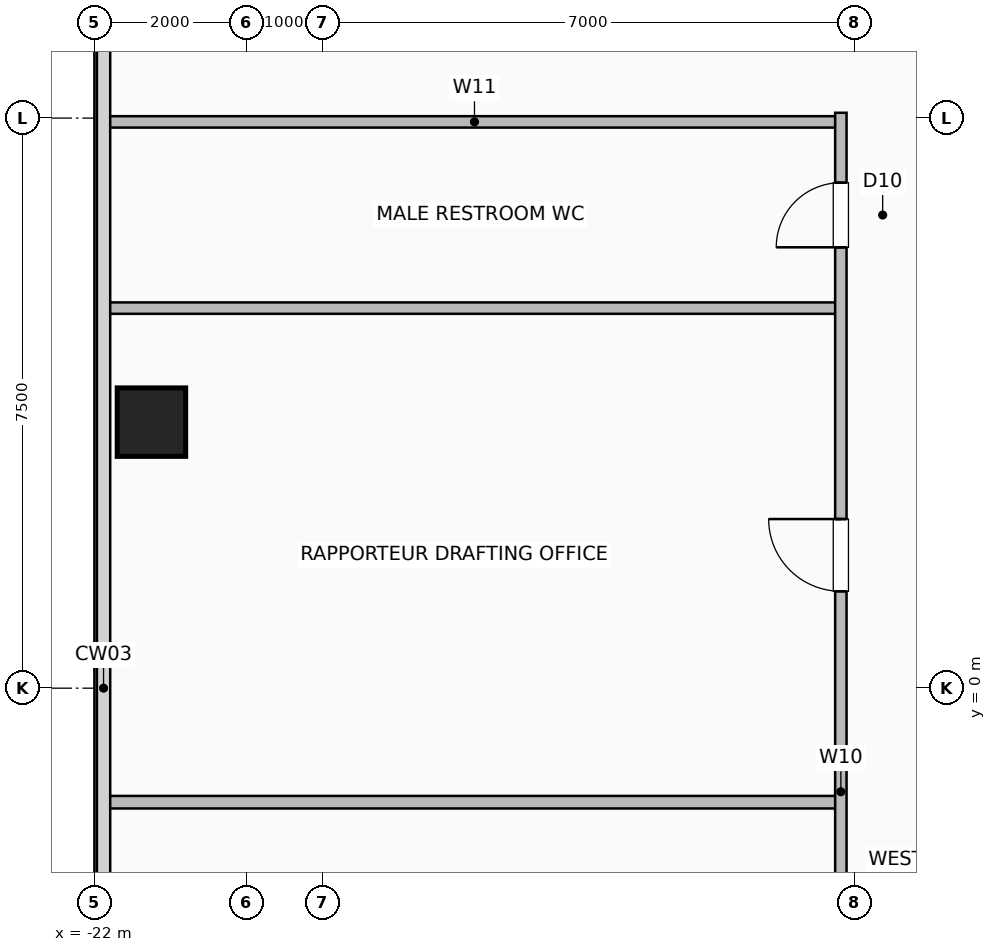
"""IFC4 building model, lengths in metres.
Left out: names, types, materials, properties, quantities, classifications, styles, units other than length and angle.
Written with IfcOpenShell. Run it as: python <this file> out.ifc"""

import sys

from ifc_helpers import new_model, si_unit, direction, frame, frame_2d, origin, origin_2d, place, context, subcontext, project, spatial, rectangle, hollow_rectangle, extrude, element, fill, save


model = new_model("IFC4")
c1 = context("Model", 3, precision=1e-05, world=origin(), true_north=direction((0.0, 1.0)))
c2 = subcontext(c1, "Body", "Model", "MODEL_VIEW")
j1 = project(units=[si_unit("LENGTHUNIT", "METRE"), si_unit("PLANEANGLEUNIT", "RADIAN")], contexts=[c1])
p1 = place(None, origin())
s1 = spatial("IfcSite", under=j1, at=p1, CompositionType="ELEMENT")
p2 = place(p1, origin())
s2 = spatial("IfcBuilding", under=s1, at=p2, CompositionType="ELEMENT")
p3 = place(p2, frame((0.0, 0.0, 97.6)))
s3 = spatial("IfcBuildingStorey", under=s2, at=p3, CompositionType="ELEMENT", Elevation=97.6)
p4 = place(p3, frame((-21.25, 3.5, 0.0), z_axis=(0.0, 0.0, 1.0), x_axis=(1.0, 0.0, 0.0)))
e1 = element("IfcColumn", 1, at=p4, inside=s3, PredefinedType="COLUMN", context=c2, shape_type="SweptSolid", body=[
    extrude(hollow_rectangle(XDim=0.9, YDim=0.9, WallThickness=0.045, at=origin_2d()), origin(), (0.0, 0.0, 1.0), 3.6),
])
p5 = place(p3, frame((-21.82, -1.5, 0.0), z_axis=(0.0, 0.0, 1.0), x_axis=(1.0, 0.0, 0.0)))
e2 = element("IfcWall", 2, at=p5, inside=s3, PredefinedType="PLUMBINGWALL", context=c2, shape_type="SweptSolid", body=[
    extrude(rectangle(XDim=9.64, YDim=0.165, at=frame_2d((4.82, 0.0))), origin(), (0.0, 0.0, 1.0), 3.36),
])
for number, where, z_axis, x_axis in (
    (3, (-21.82, 5.0, 0.0), (0.0, 0.0, 1.0), (1.0, 0.0, 0.0)),
    (4, (-21.82, 7.45, 0.0), (0.0, 0.0, 1.0), (1.0, 0.0, 0.0)),
):
    element("IfcWall", number, at=place(p3, frame(where, z_axis=z_axis, x_axis=x_axis)), inside=s3, PredefinedType="PARTITIONING", context=c2, shape_type="SweptSolid", body=[
        extrude(rectangle(XDim=9.64, YDim=0.15, at=frame_2d((4.82, 0.0))), origin(), (0.0, 0.0, 1.0), 3.36),
    ])
p6 = place(p3, frame((-12.18, -7.57, 0.0), z_axis=(0.0, 0.0, 1.0), x_axis=(0.0, 1.0, 0.0)))
e5 = element("IfcWall", 5, at=p6, inside=s3, PredefinedType="PARTITIONING", context=c2, shape_type="SweptSolid", body=[
    extrude(rectangle(XDim=15.14, YDim=0.15, at=frame_2d((7.57, 0.0))), origin(), (0.0, 0.0, 1.0), 3.36),
])
p7 = place(p6, frame((2.62, 0.0, 0.0)))
e6 = element("IfcOpeningElement", 6, at=p7, cuts=e5, PredefinedType="OPENING", context=c2, shape_type="SweptSolid", body=[
    extrude(rectangle(XDim=0.95, YDim=2.06, at=frame_2d((0.475, 1.03))), frame((0.0, 0.085, 0.0), z_axis=(0.0, -1.0, 0.0), x_axis=(1.0, 0.0, 0.0)), (0.0, 0.0, 1.0), 0.17),
])
p8 = place(p6, frame((8.845, 0.0, 0.0)))
e7 = element("IfcOpeningElement", 7, at=p8, cuts=e5, PredefinedType="OPENING", context=c2, shape_type="SweptSolid", body=[
    extrude(rectangle(XDim=0.95, YDim=2.06, at=frame_2d((0.475, 1.03))), frame((0.0, 0.085, 0.0), z_axis=(0.0, -1.0, 0.0), x_axis=(1.0, 0.0, 0.0)), (0.0, 0.0, 1.0), 0.17),
])
p9 = place(p6, frame((13.37, 0.0, 0.0)))
e8 = element("IfcOpeningElement", 8, at=p9, cuts=e5, PredefinedType="OPENING", context=c2, shape_type="SweptSolid", body=[
    extrude(rectangle(XDim=0.85, YDim=2.05, at=frame_2d((0.425, 1.025))), frame((0.0, 0.085, 0.0), z_axis=(0.0, -1.0, 0.0), x_axis=(1.0, 0.0, 0.0)), (0.0, 0.0, 1.0), 0.17),
])
p10 = place(p8, origin())
e9 = element("IfcDoor", 9, at=p10, inside=s3, OperationType="SINGLE_SWING_RIGHT", PredefinedType="DOOR", context=c2, shape_type="SweptSolid", body=[
    extrude(rectangle(XDim=0.95, YDim=2.06, at=frame_2d((0.475, 1.03))), frame((0.0, 0.025, 0.0), z_axis=(0.0, -1.0, 0.0), x_axis=(1.0, 0.0, 0.0)), (0.0, 0.0, 1.0), 0.05),
])
fill(e7, e9)
p11 = place(p9, origin())
e10 = element("IfcDoor", 10, at=p11, inside=s3, OperationType="SINGLE_SWING_LEFT", PredefinedType="DOOR", context=c2, shape_type="SweptSolid", body=[
    extrude(rectangle(XDim=0.85, YDim=2.05, at=frame_2d((0.425, 1.025))), frame((0.0, 0.025, 0.0), z_axis=(0.0, -1.0, 0.0), x_axis=(1.0, 0.0, 0.0)), (0.0, 0.0, 1.0), 0.05),
])
fill(e8, e10)
save(model, sys.argv[1])
